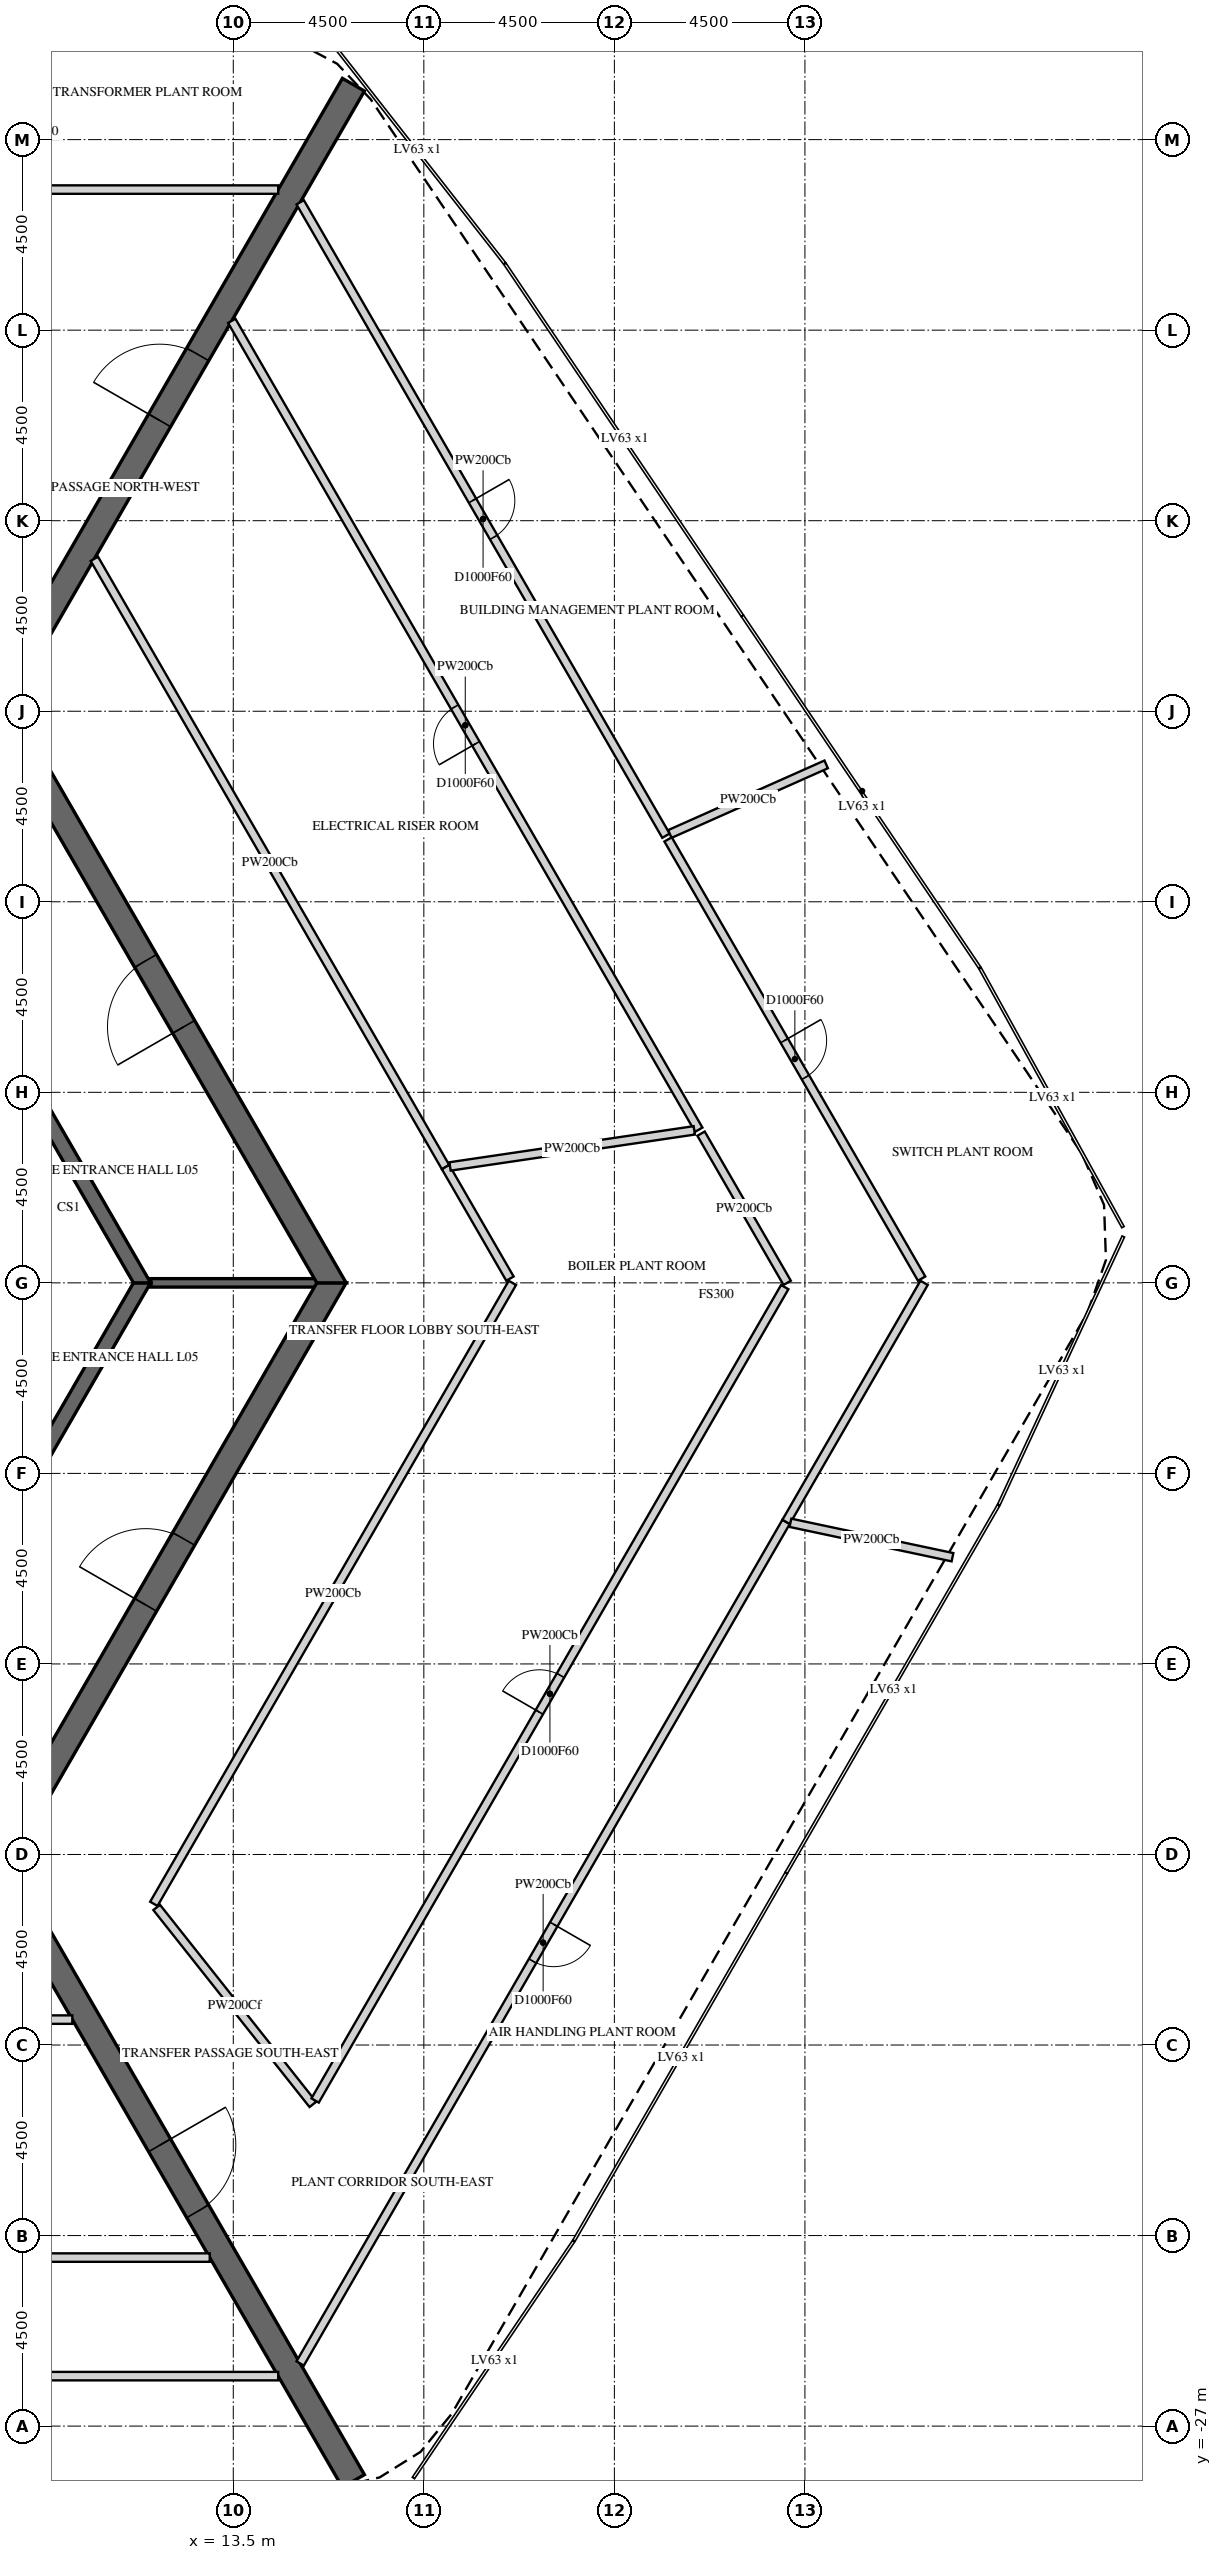
"""IFC4 building model, lengths in metres.
Left out: names, types, materials, properties, quantities, classifications, styles, units other than length and angle.
Written with IfcOpenShell. Run it as: python <this file> out.ifc"""

import sys

from ifc_helpers import new_model, si_unit, direction, frame, frame_2d, origin, place, context, subcontext, project, spatial, polyline, rectangle, outline, extrude, element, fill, save


model = new_model("IFC4")
c1 = context("Model", 3, precision=1e-05, world=origin(), true_north=direction((0.0, 1.0)))
c2 = subcontext(c1, "Body", "Model", "MODEL_VIEW")
j1 = project(units=[si_unit("LENGTHUNIT", "METRE"), si_unit("PLANEANGLEUNIT", "RADIAN")], contexts=[c1])
p1 = place(None, origin())
s1 = spatial("IfcSite", under=j1, at=p1, CompositionType="ELEMENT")
p2 = place(p1, origin())
s2 = spatial("IfcBuilding", under=s1, at=p2, CompositionType="ELEMENT")
p3 = place(p2, frame((0.0, 0.0, 31.5)))
s3 = spatial("IfcBuildingStorey", under=s2, at=p3, CompositionType="ELEMENT", Elevation=31.5)
p4 = place(p3, frame((7.91, -13.7, -0.3), z_axis=(0.0, 0.0, 1.0), x_axis=(0.499999880136, 0.866025472988, 0.0)))
e1 = element("IfcWall", 1, at=p4, inside=s3, PredefinedType="SHEAR", context=c2, shape_type="SweptSolid", body=[
    extrude(outline(polyline([(-0.173, -0.3), (15.993, -0.3), (15.646, 0.3), (0.173, 0.3), (-0.173, -0.3)])), origin(), (0.0, 0.0, 1.0), 6.15),
])
p5 = place(p4, frame((7.039, 0.0, 0.3)))
e2 = element("IfcOpeningElement", 2, at=p5, cuts=e1, PredefinedType="OPENING", context=c2, shape_type="SweptSolid", body=[
    extrude(rectangle(XDim=1.8, YDim=2.4, at=frame_2d((0.9, 1.2))), frame((0.0, 0.31, 0.0), z_axis=(0.0, -1.0, 0.0), x_axis=(1.0, 0.0, 0.0)), (0.0, 0.0, 1.0), 0.62),
])
p6 = place(p3, frame((15.819, 0.0, -0.3), z_axis=(0.0, 0.0, 1.0), x_axis=(-0.499999880136, 0.866025472988, 0.0)))
e3 = element("IfcWall", 3, at=p6, inside=s3, PredefinedType="SHEAR", context=c2, shape_type="SweptSolid", body=[
    extrude(outline(polyline([(-0.173, -0.3), (15.993, -0.3), (15.646, 0.3), (0.173, 0.3), (-0.173, -0.3)])), origin(), (0.0, 0.0, 1.0), 6.15),
])
p7 = place(p6, frame((6.981, 0.0, 0.3)))
e4 = element("IfcOpeningElement", 4, at=p7, cuts=e3, PredefinedType="OPENING", context=c2, shape_type="SweptSolid", body=[
    extrude(rectangle(XDim=1.8, YDim=2.4, at=frame_2d((0.9, 1.2))), frame((0.0, 0.31, 0.0), z_axis=(0.0, -1.0, 0.0), x_axis=(1.0, 0.0, 0.0)), (0.0, 0.0, 1.0), 0.62),
])
p8 = place(p3, frame((8.083, 14.0, -0.3), z_axis=(0.0, 0.0, 1.0), x_axis=(0.499997680643, 0.866026742862, 0.0)))
e5 = element("IfcWall", 5, at=p8, inside=s3, PredefinedType="SHEAR", context=c2, shape_type="SweptSolid", body=[
    extrude(rectangle(XDim=16.509, YDim=0.6, at=frame_2d((8.254, 0.0))), origin(), (0.0, 0.0, 1.0), 6.15),
])
p9 = place(p8, frame((7.354, 0.0, 0.3)))
e6 = element("IfcOpeningElement", 6, at=p9, cuts=e5, PredefinedType="OPENING", context=c2, shape_type="SweptSolid", body=[
    extrude(rectangle(XDim=1.8, YDim=2.4, at=frame_2d((0.9, 1.2))), frame((0.0, 0.31, 0.0), z_axis=(0.0, -1.0, 0.0), x_axis=(1.0, 0.0, 0.0)), (0.0, 0.0, 1.0), 0.62),
])
p10 = place(p3, frame((8.083, -14.0, -0.3), z_axis=(0.0, 0.0, 1.0), x_axis=(0.499997680643, -0.866026742862, 0.0)))
e7 = element("IfcWall", 7, at=p10, inside=s3, PredefinedType="SHEAR", context=c2, shape_type="SweptSolid", body=[
    extrude(rectangle(XDim=16.509, YDim=0.6, at=frame_2d((8.254, 0.0))), origin(), (0.0, 0.0, 1.0), 6.15),
])
p11 = place(p10, frame((7.354, 0.0, 0.3)))
e8 = element("IfcOpeningElement", 8, at=p11, cuts=e7, PredefinedType="OPENING", context=c2, shape_type="SweptSolid", body=[
    extrude(rectangle(XDim=1.8, YDim=2.4, at=frame_2d((0.9, 1.2))), frame((0.0, 0.31, 0.0), z_axis=(0.0, -1.0, 0.0), x_axis=(1.0, 0.0, 0.0)), (0.0, 0.0, 1.0), 0.62),
])
p12 = place(p3, frame((5.673, -9.825, -0.3), z_axis=(0.0, 0.0, 1.0), x_axis=(0.499995046907, 0.866028263435, 0.0)))
e9 = element("IfcWall", 9, at=p12, inside=s3, PredefinedType="SHEAR", context=c2, shape_type="SweptSolid", body=[
    extrude(outline(polyline([(-0.101, -0.175), (11.446, -0.175), (11.244, 0.175), (0.101, 0.175), (-0.101, -0.175)])), origin(), (0.0, 0.0, 1.0), 6.15),
])
p13 = place(p12, frame((4.801, 0.0, 0.3)))
e10 = element("IfcOpeningElement", 10, at=p13, cuts=e9, PredefinedType="OPENING", context=c2, shape_type="SweptSolid", body=[
    extrude(rectangle(XDim=1.8, YDim=2.4, at=frame_2d((0.9, 1.2))), frame((0.0, 0.185, 0.0), z_axis=(0.0, -1.0, 0.0), x_axis=(1.0, 0.0, 0.0)), (0.0, 0.0, 1.0), 0.37),
])
p14 = place(p3, frame((11.345, 0.0, -0.3), z_axis=(0.0, 0.0, 1.0), x_axis=(-0.499995046907, 0.866028263435, 0.0)))
e11 = element("IfcWall", 11, at=p14, inside=s3, PredefinedType="SHEAR", context=c2, shape_type="SweptSolid", body=[
    extrude(outline(polyline([(-0.101, -0.175), (11.446, -0.175), (11.244, 0.175), (0.101, 0.175), (-0.101, -0.175)])), origin(), (0.0, 0.0, 1.0), 6.15),
])
p15 = place(p14, frame((4.744, 0.0, 0.3)))
e12 = element("IfcOpeningElement", 12, at=p15, cuts=e11, PredefinedType="OPENING", context=c2, shape_type="SweptSolid", body=[
    extrude(rectangle(XDim=1.8, YDim=2.4, at=frame_2d((0.9, 1.2))), frame((0.0, 0.185, 0.0), z_axis=(0.0, -1.0, 0.0), x_axis=(1.0, 0.0, 0.0)), (0.0, 0.0, 1.0), 0.37),
])
p16 = place(p3, frame((11.547, 0.0, -0.3), z_axis=(0.0, 0.0, 1.0), x_axis=(1.0, 0.0, 0.0)))
e13 = element("IfcWall", 13, at=p16, inside=s3, PredefinedType="SHEAR", context=c2, shape_type="SweptSolid", body=[
    extrude(rectangle(XDim=3.926, YDim=0.2, at=frame_2d((1.963, 0.0))), origin(), (0.0, 0.0, 1.0), 6.15),
])
p17 = place(p3, frame((-2.468, -17.4, 0.0), z_axis=(0.0, 0.0, 1.0), x_axis=(1.0, 0.0, 0.0)))
e14 = element("IfcWall", 14, at=p17, inside=s3, PredefinedType="PARTITIONING", context=c2, shape_type="SweptSolid", body=[
    extrude(rectangle(XDim=12.167, YDim=0.2, at=frame_2d((6.083, 0.0))), origin(), (0.0, 0.0, 1.0), 5.85),
])
p18 = place(p3, frame((14.561, -25.82, 0.0), z_axis=(0.0, 0.0, 1.0), x_axis=(-1.0, 0.0, 0.0)))
e15 = element("IfcWall", 15, at=p18, inside=s3, PredefinedType="PARTITIONING", context=c2, shape_type="SweptSolid", body=[
    extrude(rectangle(XDim=14.02, YDim=0.2, at=frame_2d((7.01, 0.0))), origin(), (0.0, 0.0, 1.0), 5.85),
])
p19 = place(p18, frame((6.51, 0.0, 0.0)))
e16 = element("IfcOpeningElement", 16, at=p19, cuts=e15, PredefinedType="OPENING", context=c2, shape_type="SweptSolid", body=[
    extrude(rectangle(XDim=1.0, YDim=2.1, at=frame_2d((0.5, 1.05))), frame((0.0, 0.11, 0.0), z_axis=(0.0, -1.0, 0.0), x_axis=(1.0, 0.0, 0.0)), (0.0, 0.0, 1.0), 0.22),
])
p20 = place(p3, frame((11.624, -14.666, 0.0), z_axis=(0.0, 0.0, 1.0), x_axis=(0.500026107117, 0.866010330309, 0.0)))
e17 = element("IfcWall", 17, at=p20, inside=s3, PredefinedType="PARTITIONING", context=c2, shape_type="SweptSolid", body=[
    extrude(rectangle(XDim=16.935, YDim=0.2, at=frame_2d((8.468, 0.0))), origin(), (0.0, 0.0, 1.0), 5.85),
])
p21 = place(p3, frame((-3.298, -23.02, 0.0), z_axis=(0.0, 0.0, 1.0), x_axis=(1.0, 0.0, 0.0)))
e18 = element("IfcWall", 18, at=p21, inside=s3, PredefinedType="PARTITIONING", context=c2, shape_type="SweptSolid", body=[
    extrude(rectangle(XDim=16.242, YDim=0.2, at=frame_2d((8.121, 0.0))), origin(), (0.0, 0.0, 1.0), 5.85),
])
p22 = place(p21, frame((7.621, 0.0, 0.0)))
e19 = element("IfcOpeningElement", 19, at=p22, cuts=e18, PredefinedType="OPENING", context=c2, shape_type="SweptSolid", body=[
    extrude(rectangle(XDim=1.0, YDim=2.1, at=frame_2d((0.5, 1.05))), frame((0.0, 0.11, 0.0), z_axis=(0.0, -1.0, 0.0), x_axis=(1.0, 0.0, 0.0)), (0.0, 0.0, 1.0), 0.22),
])
p23 = place(p3, frame((24.493, 3.617, 0.0), z_axis=(0.0, 0.0, 1.0), x_axis=(-0.49998880049, 0.866031869728, 0.0)))
e20 = element("IfcWall", 20, at=p23, inside=s3, PredefinedType="PARTITIONING", context=c2, shape_type="SweptSolid", body=[
    extrude(rectangle(XDim=22.058, YDim=0.2, at=frame_2d((11.029, 0.0))), origin(), (0.0, 0.0, 1.0), 5.85),
])
p24 = place(p23, frame((10.529, 0.0, 0.0)))
e21 = element("IfcOpeningElement", 21, at=p24, cuts=e20, PredefinedType="OPENING", context=c2, shape_type="SweptSolid", body=[
    extrude(rectangle(XDim=1.0, YDim=2.1, at=frame_2d((0.5, 1.05))), frame((0.0, 0.11, 0.0), z_axis=(0.0, -1.0, 0.0), x_axis=(1.0, 0.0, 0.0)), (0.0, 0.0, 1.0), 0.22),
])
p25 = place(p3, frame((2.814, 25.82, 0.0), z_axis=(0.0, 0.0, 1.0), x_axis=(1.0, 0.0, 0.0)))
e22 = element("IfcWall", 22, at=p25, inside=s3, PredefinedType="PARTITIONING", context=c2, shape_type="SweptSolid", body=[
    extrude(rectangle(XDim=11.747, YDim=0.2, at=frame_2d((5.873, 0.0))), origin(), (0.0, 0.0, 1.0), 5.85),
])
p26 = place(p25, frame((5.373, 0.0, 0.0)))
e23 = element("IfcOpeningElement", 23, at=p26, cuts=e22, PredefinedType="OPENING", context=c2, shape_type="SweptSolid", body=[
    extrude(rectangle(XDim=1.0, YDim=2.1, at=frame_2d((0.5, 1.05))), frame((0.0, 0.11, 0.0), z_axis=(0.0, -1.0, 0.0), x_axis=(1.0, 0.0, 0.0)), (0.0, 0.0, 1.0), 0.22),
])
p27 = place(p3, frame((26.555, -5.645, 0.0), z_axis=(0.0, 0.0, 1.0), x_axis=(-0.500000552801, -0.866025084624, 0.0)))
e24 = element("IfcWall", 24, at=p27, inside=s3, PredefinedType="PARTITIONING", context=c2, shape_type="SweptSolid", body=[
    extrude(rectangle(XDim=22.95, YDim=0.2, at=frame_2d((11.475, 0.0))), origin(), (0.0, 0.0, 1.0), 5.85),
])
p28 = place(p27, frame((10.975, 0.0, 0.0)))
e25 = element("IfcOpeningElement", 25, at=p28, cuts=e24, PredefinedType="OPENING", context=c2, shape_type="SweptSolid", body=[
    extrude(rectangle(XDim=1.0, YDim=2.1, at=frame_2d((0.5, 1.05))), frame((0.0, 0.11, 0.0), z_axis=(0.0, -1.0, 0.0), x_axis=(1.0, 0.0, 0.0)), (0.0, 0.0, 1.0), 0.22),
])
p29 = place(p3, frame((15.379, -19.403, 0.0), z_axis=(0.0, 0.0, 1.0), x_axis=(-0.62116837149, 0.783677136492, 0.0)))
e26 = element("IfcWall", 26, at=p29, inside=s3, PredefinedType="PARTITIONING", context=c2, shape_type="SweptSolid", body=[
    extrude(rectangle(XDim=5.937, YDim=0.2, at=frame_2d((2.969, 0.0))), origin(), (0.0, 0.0, 1.0), 5.088),
])
p30 = place(p3, frame((18.513, 2.734, 0.0), z_axis=(0.0, 0.0, 1.0), x_axis=(-0.499982347303, 0.866035595334, 0.0)))
e27 = element("IfcWall", 27, at=p30, inside=s3, PredefinedType="PARTITIONING", context=c2, shape_type="SweptSolid", body=[
    extrude(rectangle(XDim=16.588, YDim=0.2, at=frame_2d((8.294, 0.0))), origin(), (0.0, 0.0, 1.0), 5.85),
])
p31 = place(p3, frame((20.034, 0.1, 0.0), z_axis=(0.0, 0.0, 1.0), x_axis=(-0.500153222552, 0.865936922628, 0.0)))
e28 = element("IfcWall", 28, at=p31, inside=s3, PredefinedType="PARTITIONING", context=c2, shape_type="SweptSolid", body=[
    extrude(rectangle(XDim=3.042, YDim=0.2, at=frame_2d((1.521, 0.0))), origin(), (0.0, 0.0, 1.0), 5.85),
])
p32 = place(p3, frame((15.08, 25.52, 0.0), z_axis=(0.0, 0.0, 1.0), x_axis=(0.500034818431, -0.866005300421, 0.0)))
e29 = element("IfcWall", 29, at=p32, inside=s3, PredefinedType="PARTITIONING", context=c2, shape_type="SweptSolid", body=[
    extrude(rectangle(XDim=17.275, YDim=0.2, at=frame_2d((8.637, 0.0))), origin(), (0.0, 0.0, 1.0), 5.85),
])
p33 = place(p32, frame((8.137, 0.0, 0.0)))
e30 = element("IfcOpeningElement", 30, at=p33, cuts=e29, PredefinedType="OPENING", context=c2, shape_type="SweptSolid", body=[
    extrude(rectangle(XDim=1.0, YDim=2.1, at=frame_2d((0.5, 1.05))), frame((0.0, 0.11, 0.0), z_axis=(0.0, -1.0, 0.0), x_axis=(1.0, 0.0, 0.0)), (0.0, 0.0, 1.0), 0.22),
])
p34 = place(p3, frame((24.387, 3.601, 0.0), z_axis=(0.0, 0.0, 1.0), x_axis=(-0.989274397473, -0.146069047047, 0.0)))
e31 = element("IfcWall", 31, at=p34, inside=s3, PredefinedType="PARTITIONING", context=c2, shape_type="SweptSolid", body=[
    extrude(rectangle(XDim=5.83, YDim=0.2, at=frame_2d((2.915, 0.0))), origin(), (0.0, 0.0, 1.0), 5.85),
])
p35 = place(p3, frame((24.547, 3.524, 0.0), z_axis=(0.0, 0.0, 1.0), x_axis=(0.499933676373, -0.866063692362, 0.0)))
e32 = element("IfcWall", 32, at=p35, inside=s3, PredefinedType="PARTITIONING", context=c2, shape_type="SweptSolid", body=[
    extrude(rectangle(XDim=4.069, YDim=0.2, at=frame_2d((2.034, 0.0))), origin(), (0.0, 0.0, 1.0), 5.85),
])
p36 = place(p3, frame((26.555, -5.645, 0.0), z_axis=(0.0, 0.0, 1.0), x_axis=(0.499986153097, 0.86603339815, 0.0)))
e33 = element("IfcWall", 33, at=p36, inside=s3, PredefinedType="PARTITIONING", context=c2, shape_type="SweptSolid", body=[
    extrude(rectangle(XDim=6.518, YDim=0.2, at=frame_2d((3.259, 0.0))), origin(), (0.0, 0.0, 1.0), 5.85),
])
p37 = place(p3, frame((15.433, -19.31, 0.0), z_axis=(0.0, 0.0, 1.0), x_axis=(0.499986369096, 0.866033273447, 0.0)))
e34 = element("IfcWall", 34, at=p37, inside=s3, PredefinedType="PARTITIONING", context=c2, shape_type="SweptSolid", body=[
    extrude(rectangle(XDim=22.181, YDim=0.2, at=frame_2d((11.091, 0.0))), origin(), (0.0, 0.0, 1.0), 5.85),
])
p38 = place(p37, frame((10.591, 0.0, 0.0)))
e35 = element("IfcOpeningElement", 35, at=p38, cuts=e34, PredefinedType="OPENING", context=c2, shape_type="SweptSolid", body=[
    extrude(rectangle(XDim=1.0, YDim=2.1, at=frame_2d((0.5, 1.05))), frame((0.0, 0.11, 0.0), z_axis=(0.0, -1.0, 0.0), x_axis=(1.0, 0.0, 0.0)), (0.0, 0.0, 1.0), 0.22),
])
p39 = place(p3, frame((27.502, 12.244, 0.0), z_axis=(0.0, 0.0, 1.0), x_axis=(-0.913562251787, -0.406698920714, 0.0)))
e36 = element("IfcWall", 36, at=p39, inside=s3, PredefinedType="PARTITIONING", context=c2, shape_type="SweptSolid", body=[
    extrude(rectangle(XDim=4.041, YDim=0.2, at=frame_2d((2.021, 0.0))), origin(), (0.0, 0.0, 1.0), 5.85),
])
p40 = place(p3, frame((23.768, 10.473, 0.0), z_axis=(0.0, 0.0, 1.0), x_axis=(0.499955956564, -0.866050830781, 0.0)))
e37 = element("IfcWall", 37, at=p40, inside=s3, PredefinedType="PARTITIONING", context=c2, shape_type="SweptSolid", body=[
    extrude(rectangle(XDim=11.977, YDim=0.2, at=frame_2d((5.989, 0.0))), origin(), (0.0, 0.0, 1.0), 5.85),
])
p41 = place(p40, frame((5.489, 0.0, 0.0)))
e38 = element("IfcOpeningElement", 38, at=p41, cuts=e37, PredefinedType="OPENING", context=c2, shape_type="SweptSolid", body=[
    extrude(rectangle(XDim=1.0, YDim=2.1, at=frame_2d((0.5, 1.05))), frame((0.0, 0.11, 0.0), z_axis=(0.0, -1.0, 0.0), x_axis=(1.0, 0.0, 0.0)), (0.0, 0.0, 1.0), 0.22),
])
p42 = place(p3, frame((30.485, -6.479, 0.0), z_axis=(0.0, 0.0, 1.0), x_axis=(-0.978180733494, 0.207755752316, 0.0)))
e39 = element("IfcWall", 39, at=p42, inside=s3, PredefinedType="PARTITIONING", context=c2, shape_type="SweptSolid", body=[
    extrude(rectangle(XDim=3.912, YDim=0.2, at=frame_2d((1.956, 0.0))), origin(), (0.0, 0.0, 1.0), 5.85),
])
p43 = place(p7, origin())
e40 = element("IfcDoor", 40, at=p43, inside=s3, OperationType="DOUBLE_DOOR_SINGLE_SWING", PredefinedType="DOOR", context=c2, shape_type="SweptSolid", body=[
    extrude(rectangle(XDim=1.8, YDim=2.4, at=frame_2d((0.9, 1.2))), frame((0.0, 0.025, 0.0), z_axis=(0.0, -1.0, 0.0), x_axis=(1.0, 0.0, 0.0)), (0.0, 0.0, 1.0), 0.05),
])
fill(e4, e40)
p44 = place(p5, origin())
e41 = element("IfcDoor", 41, at=p44, inside=s3, OperationType="DOUBLE_DOOR_SINGLE_SWING", PredefinedType="DOOR", context=c2, shape_type="SweptSolid", body=[
    extrude(rectangle(XDim=1.8, YDim=2.4, at=frame_2d((0.9, 1.2))), frame((0.0, 0.025, 0.0), z_axis=(0.0, -1.0, 0.0), x_axis=(1.0, 0.0, 0.0)), (0.0, 0.0, 1.0), 0.05),
])
fill(e2, e41)
p45 = place(p9, origin())
e42 = element("IfcDoor", 42, at=p45, inside=s3, OperationType="DOUBLE_DOOR_SINGLE_SWING", PredefinedType="DOOR", context=c2, shape_type="SweptSolid", body=[
    extrude(rectangle(XDim=1.8, YDim=2.4, at=frame_2d((0.9, 1.2))), frame((0.0, 0.025, 0.0), z_axis=(0.0, -1.0, 0.0), x_axis=(1.0, 0.0, 0.0)), (0.0, 0.0, 1.0), 0.05),
])
fill(e6, e42)
p46 = place(p11, origin())
e43 = element("IfcDoor", 43, at=p46, inside=s3, OperationType="DOUBLE_DOOR_SINGLE_SWING", PredefinedType="DOOR", context=c2, shape_type="SweptSolid", body=[
    extrude(rectangle(XDim=1.8, YDim=2.4, at=frame_2d((0.9, 1.2))), frame((0.0, 0.025, 0.0), z_axis=(0.0, -1.0, 0.0), x_axis=(1.0, 0.0, 0.0)), (0.0, 0.0, 1.0), 0.05),
])
fill(e8, e43)
p47 = place(p24, origin())
e44 = element("IfcDoor", 44, at=p47, inside=s3, OperationType="SINGLE_SWING_RIGHT", PredefinedType="DOOR", context=c2, shape_type="SweptSolid", body=[
    extrude(rectangle(XDim=1.0, YDim=2.1, at=frame_2d((0.5, 1.05))), frame((0.0, 0.025, 0.0), z_axis=(0.0, -1.0, 0.0), x_axis=(1.0, 0.0, 0.0)), (0.0, 0.0, 1.0), 0.05),
])
fill(e21, e44)
p48 = place(p28, origin())
e45 = element("IfcDoor", 45, at=p48, inside=s3, OperationType="SINGLE_SWING_RIGHT", PredefinedType="DOOR", context=c2, shape_type="SweptSolid", body=[
    extrude(rectangle(XDim=1.0, YDim=2.1, at=frame_2d((0.5, 1.05))), frame((0.0, 0.025, 0.0), z_axis=(0.0, -1.0, 0.0), x_axis=(1.0, 0.0, 0.0)), (0.0, 0.0, 1.0), 0.05),
])
fill(e25, e45)
p49 = place(p33, origin())
e46 = element("IfcDoor", 46, at=p49, inside=s3, OperationType="SINGLE_SWING_LEFT", PredefinedType="DOOR", context=c2, shape_type="SweptSolid", body=[
    extrude(rectangle(XDim=1.0, YDim=2.1, at=frame_2d((0.5, 1.05))), frame((0.0, 0.025, 0.0), z_axis=(0.0, -1.0, 0.0), x_axis=(1.0, 0.0, 0.0)), (0.0, 0.0, 1.0), 0.05),
])
fill(e30, e46)
p50 = place(p38, origin())
e47 = element("IfcDoor", 47, at=p50, inside=s3, OperationType="SINGLE_SWING_RIGHT", PredefinedType="DOOR", context=c2, shape_type="SweptSolid", body=[
    extrude(rectangle(XDim=1.0, YDim=2.1, at=frame_2d((0.5, 1.05))), frame((0.0, 0.025, 0.0), z_axis=(0.0, -1.0, 0.0), x_axis=(1.0, 0.0, 0.0)), (0.0, 0.0, 1.0), 0.05),
])
fill(e35, e47)
p51 = place(p41, origin())
e48 = element("IfcDoor", 48, at=p51, inside=s3, OperationType="SINGLE_SWING_LEFT", PredefinedType="DOOR", context=c2, shape_type="SweptSolid", body=[
    extrude(rectangle(XDim=1.0, YDim=2.1, at=frame_2d((0.5, 1.05))), frame((0.0, 0.025, 0.0), z_axis=(0.0, -1.0, 0.0), x_axis=(1.0, 0.0, 0.0)), (0.0, 0.0, 1.0), 0.05),
])
fill(e38, e48)
save(model, sys.argv[1])
